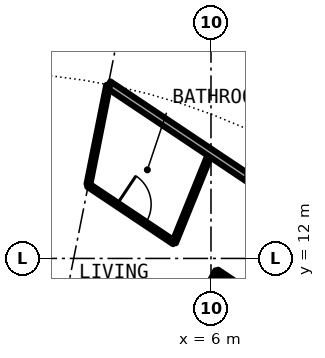
"""IFC4 building model, lengths in metres.
Left out: names, types, materials, properties, quantities, classifications, styles, units other than length and angle.
Written with IfcOpenShell. Run it as: python <this file> out.ifc"""

import sys

from ifc_helpers import new_model, si_unit, direction, frame, frame_2d, origin, place, context, subcontext, project, spatial, rectangle, extrude, element, fill, save


model = new_model("IFC4")
c1 = context("Model", 3, precision=1e-05, world=origin(), true_north=direction((0.0, 1.0)))
c2 = subcontext(c1, "Body", "Model", "MODEL_VIEW")
j1 = project(units=[si_unit("LENGTHUNIT", "METRE"), si_unit("PLANEANGLEUNIT", "RADIAN")], contexts=[c1])
p1 = place(None, origin())
s1 = spatial("IfcSite", under=j1, at=p1, CompositionType="ELEMENT")
p2 = place(p1, origin())
s2 = spatial("IfcBuilding", under=s1, at=p2, CompositionType="ELEMENT")
p3 = place(p2, frame((0.0, 0.0, 31.95)))
s3 = spatial("IfcBuildingStorey", under=s2, at=p3, CompositionType="ELEMENT", Elevation=31.95)
p4 = place(p3, frame((3.606, 6.827, 0.0), z_axis=(0.0, 0.0, 1.0), x_axis=(0.466976820365, 0.884269556889, 0.0)))
e1 = element("IfcWall", 1, at=p4, inside=s3, PredefinedType="PARTITIONING", context=c2, shape_type="SweptSolid", body=[
    extrude(rectangle(XDim=5.469, YDim=0.1, at=frame_2d((2.735, 0.0))), origin(), (0.0, 0.0, 1.0), 2.7),
])
p5 = place(p4, frame((2.284, 0.0, 0.0)))
e2 = element("IfcOpeningElement", 2, at=p5, cuts=e1, PredefinedType="OPENING", context=c2, shape_type="SweptSolid", body=[
    extrude(rectangle(XDim=0.9, YDim=2.3, at=frame_2d((0.45, 1.15))), frame((0.0, 0.06, 0.0), z_axis=(0.0, -1.0, 0.0), x_axis=(1.0, 0.0, 0.0)), (0.0, 0.0, 1.0), 0.12),
])
p6 = place(p3, frame((5.029, 12.418, 0.0), z_axis=(0.0, 0.0, 1.0), x_axis=(0.375649498413, 0.926761811008, 0.0)))
e3 = element("IfcWall", 3, at=p6, inside=s3, PredefinedType="PARTITIONING", context=c2, shape_type="SweptSolid", body=[
    extrude(rectangle(XDim=2.548, YDim=0.1, at=frame_2d((1.274, 0.0))), origin(), (0.0, 0.0, 1.0), 2.7),
])
p7 = place(p3, frame((2.771, 13.926, 0.0), z_axis=(0.0, 0.0, 1.0), x_axis=(0.831538390496, -0.555467285384, 0.0)))
e4 = element("IfcWall", 4, at=p7, inside=s3, PredefinedType="PARTITIONING", context=c2, shape_type="SweptSolid", body=[
    extrude(rectangle(XDim=2.717, YDim=0.1, at=frame_2d((1.358, 0.0))), origin(), (0.0, 0.0, 1.0), 2.7),
])
p8 = place(p7, frame((0.907, 0.0, 0.0)))
e5 = element("IfcOpeningElement", 5, at=p8, cuts=e4, PredefinedType="OPENING", context=c2, shape_type="SweptSolid", body=[
    extrude(rectangle(XDim=0.9, YDim=2.3, at=frame_2d((0.45, 1.15))), frame((0.0, 0.06, 0.0), z_axis=(0.0, -1.0, 0.0), x_axis=(1.0, 0.0, 0.0)), (0.0, 0.0, 1.0), 0.12),
])
p9 = place(p3, frame((6.159, 11.663, 0.0), z_axis=(0.0, 0.0, 1.0), x_axis=(0.831459707426, -0.555585056429, 0.0)))
e6 = element("IfcWall", 6, at=p9, inside=s3, PredefinedType="PARTITIONING", context=c2, shape_type="SweptSolid", body=[
    extrude(rectangle(XDim=4.073, YDim=0.1, at=frame_2d((2.037, 0.0))), origin(), (0.0, 0.0, 1.0), 2.7),
])
p10 = place(p3, frame((3.299, 16.574, 0.0), z_axis=(0.0, 0.0, 1.0), x_axis=(0.831465254975, -0.555576754166, 0.0)))
e7 = element("IfcWall", 7, at=p10, inside=s3, PredefinedType="PARTITIONING", context=c2, shape_type="SweptSolid", body=[
    extrude(rectangle(XDim=12.915, YDim=0.2, at=frame_2d((6.457, 0.0))), origin(), (0.0, 0.0, 1.0), 2.7),
])
p11 = place(p10, frame((4.346, 0.0, 0.0)))
e8 = element("IfcOpeningElement", 8, at=p11, cuts=e7, PredefinedType="OPENING", context=c2, shape_type="SweptSolid", body=[
    extrude(rectangle(XDim=1.0, YDim=2.3, at=frame_2d((0.5, 1.15))), frame((0.0, 0.11, 0.0), z_axis=(0.0, -1.0, 0.0), x_axis=(1.0, 0.0, 0.0)), (0.0, 0.0, 1.0), 0.22),
])
p12 = place(p3, frame((2.774, 13.948, 0.0), z_axis=(0.0, 0.0, 1.0), x_axis=(0.195338620417, 0.980735858105, 0.0)))
e9 = element("IfcWall", 9, at=p12, inside=s3, PredefinedType="PARTITIONING", context=c2, shape_type="SweptSolid", body=[
    extrude(rectangle(XDim=2.657, YDim=0.1, at=frame_2d((1.329, 0.0))), origin(), (0.0, 0.0, 1.0), 2.7),
])
p13 = place(p11, origin())
e10 = element("IfcDoor", 10, at=p13, inside=s3, OperationType="SINGLE_SWING_LEFT", PredefinedType="DOOR", context=c2, shape_type="SweptSolid", body=[
    extrude(rectangle(XDim=1.0, YDim=2.3, at=frame_2d((0.5, 1.15))), frame((0.0, 0.025, 0.0), z_axis=(0.0, -1.0, 0.0), x_axis=(1.0, 0.0, 0.0)), (0.0, 0.0, 1.0), 0.05),
])
fill(e8, e10)
p14 = place(p8, origin())
e11 = element("IfcDoor", 11, at=p14, inside=s3, OperationType="SINGLE_SWING_LEFT", PredefinedType="DOOR", context=c2, shape_type="SweptSolid", body=[
    extrude(rectangle(XDim=0.9, YDim=2.3, at=frame_2d((0.45, 1.15))), frame((0.0, 0.025, 0.0), z_axis=(0.0, -1.0, 0.0), x_axis=(1.0, 0.0, 0.0)), (0.0, 0.0, 1.0), 0.05),
])
fill(e5, e11)
save(model, sys.argv[1])
